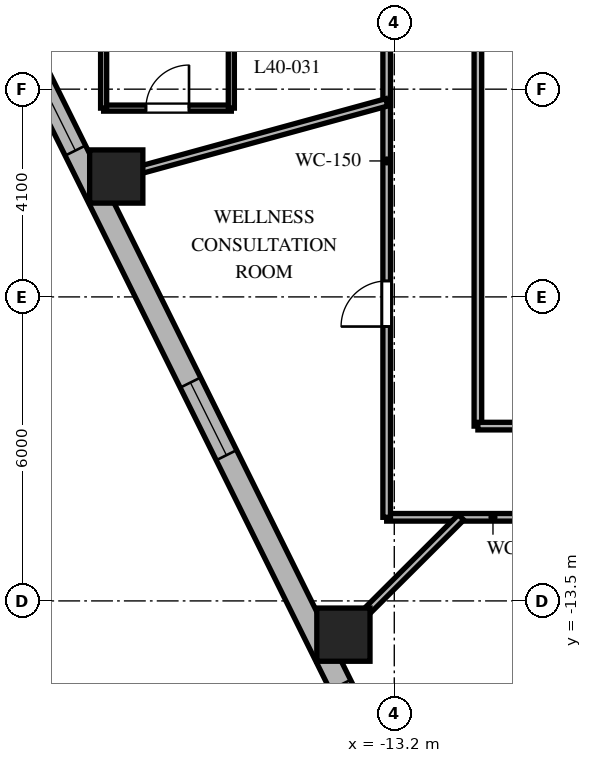
"""IFC4 building model, lengths in metres.
Left out: names, types, materials, properties, quantities, classifications, styles, units other than length and angle.
Written with IfcOpenShell. Run it as: python <this file> out.ifc"""

import sys

from ifc_helpers import new_model, si_unit, direction, frame, frame_2d, origin, origin_2d, place, context, subcontext, project, spatial, rectangle, extrude, element, fill, save


model = new_model("IFC4")
c1 = context("Model", 3, precision=1e-05, world=origin(), true_north=direction((0.0, 1.0)))
c2 = subcontext(c1, "Body", "Model", "MODEL_VIEW")
j1 = project(units=[si_unit("LENGTHUNIT", "METRE"), si_unit("PLANEANGLEUNIT", "RADIAN")], contexts=[c1])
p1 = place(None, origin())
s1 = spatial("IfcSite", under=j1, at=p1, CompositionType="ELEMENT")
p2 = place(p1, origin())
s2 = spatial("IfcBuilding", under=s1, at=p2, CompositionType="ELEMENT")
p3 = place(p2, frame((0.0, 0.0, 162.8)))
s3 = spatial("IfcBuildingStorey", under=s2, at=p3, CompositionType="ELEMENT", Elevation=162.8)
for number, where, z_axis, x_axis in (
    (1, (-18.687, -5.124, 0.0), (0.0, 0.0, 1.0), (1.0, 0.0, 0.0)),
    (2, (-14.204, -14.166, 0.0), (0.0, 0.0, 1.0), (1.0, 0.0, 0.0)),
):
    element("IfcColumn", number, at=place(p3, frame(where, z_axis=z_axis, x_axis=x_axis)), inside=s3, PredefinedType="COLUMN", context=c2, shape_type="SweptSolid", body=[
        extrude(rectangle(XDim=1.05, YDim=1.05, at=origin_2d()), origin(), (0.0, 0.0, 1.0), 3.7),
    ])
p4 = place(p3, frame((-20.618, -2.344, 0.0), z_axis=(0.0, 0.0, 1.0), x_axis=(0.444243691097, -0.895905990002, 0.0)))
e3 = element("IfcWall", 3, at=p4, inside=s3, PredefinedType="SOLIDWALL", context=c2, shape_type="SweptSolid", body=[
    extrude(rectangle(XDim=16.784, YDim=0.45, at=frame_2d((8.392, 0.0))), origin(), (0.0, 0.0, 1.0), 3.4),
])
p5 = place(p4, frame((0.931, 0.0, 0.8)))
e4 = element("IfcOpeningElement", 4, at=p5, cuts=e3, PredefinedType="OPENING", context=c2, shape_type="SweptSolid", body=[
    extrude(rectangle(XDim=1.6, YDim=1.75, at=frame_2d((0.8, 0.875))), frame((0.0, 0.235, 0.0), z_axis=(0.0, -1.0, 0.0), x_axis=(1.0, 0.0, 0.0)), (0.0, 0.0, 1.0), 0.47),
])
p6 = place(p4, frame((7.642, 0.0, 0.8)))
e5 = element("IfcOpeningElement", 5, at=p6, cuts=e3, PredefinedType="OPENING", context=c2, shape_type="SweptSolid", body=[
    extrude(rectangle(XDim=1.6, YDim=1.75, at=frame_2d((0.8, 0.875))), frame((0.0, 0.235, 0.0), z_axis=(0.0, -1.0, 0.0), x_axis=(1.0, 0.0, 0.0)), (0.0, 0.0, 1.0), 0.47),
])
p7 = place(p4, frame((14.303, 0.0, 0.8)))
e6 = element("IfcOpeningElement", 6, at=p7, cuts=e3, PredefinedType="OPENING", context=c2, shape_type="SweptSolid", body=[
    extrude(rectangle(XDim=1.6, YDim=1.75, at=frame_2d((0.8, 0.875))), frame((0.0, 0.235, 0.0), z_axis=(0.0, -1.0, 0.0), x_axis=(1.0, 0.0, 0.0)), (0.0, 0.0, 1.0), 0.47),
])
p8 = place(p3, frame((13.35, -11.85, 0.0), z_axis=(0.0, 0.0, 1.0), x_axis=(-1.0, 0.0, 0.0)))
e7 = element("IfcWall", 7, at=p8, inside=s3, PredefinedType="PARTITIONING", context=c2, shape_type="SweptSolid", body=[
    extrude(rectangle(XDim=26.7, YDim=0.15, at=frame_2d((13.35, 0.0))), origin(), (0.0, 0.0, 1.0), 2.84),
])
p9 = place(p8, frame((20.682, 0.0, 0.0)))
e8 = element("IfcOpeningElement", 8, at=p9, cuts=e7, PredefinedType="OPENING", context=c2, shape_type="SweptSolid", body=[
    extrude(rectangle(XDim=0.95, YDim=2.03, at=frame_2d((0.475, 1.015))), frame((0.0, 0.085, 0.0), z_axis=(0.0, -1.0, 0.0), x_axis=(1.0, 0.0, 0.0)), (0.0, 0.0, 1.0), 0.17),
])
p10 = place(p8, frame((14.708, 0.0, 0.0)))
e9 = element("IfcOpeningElement", 9, at=p10, cuts=e7, PredefinedType="OPENING", context=c2, shape_type="SweptSolid", body=[
    extrude(rectangle(XDim=0.95, YDim=2.03, at=frame_2d((0.475, 1.015))), frame((0.0, 0.085, 0.0), z_axis=(0.0, -1.0, 0.0), x_axis=(1.0, 0.0, 0.0)), (0.0, 0.0, 1.0), 0.17),
])
p11 = place(p8, frame((10.553, 0.0, 0.0)))
e10 = element("IfcOpeningElement", 10, at=p11, cuts=e7, PredefinedType="OPENING", context=c2, shape_type="SweptSolid", body=[
    extrude(rectangle(XDim=0.95, YDim=2.03, at=frame_2d((0.475, 1.015))), frame((0.0, 0.085, 0.0), z_axis=(0.0, -1.0, 0.0), x_axis=(1.0, 0.0, 0.0)), (0.0, 0.0, 1.0), 0.17),
])
p12 = place(p8, frame((6.353, 0.0, 0.0)))
e11 = element("IfcOpeningElement", 11, at=p12, cuts=e7, PredefinedType="OPENING", context=c2, shape_type="SweptSolid", body=[
    extrude(rectangle(XDim=0.9, YDim=2.03, at=frame_2d((0.45, 1.015))), frame((0.0, 0.085, 0.0), z_axis=(0.0, -1.0, 0.0), x_axis=(1.0, 0.0, 0.0)), (0.0, 0.0, 1.0), 0.17),
])
p13 = place(p8, frame((2.15, 0.0, 0.0)))
e12 = element("IfcOpeningElement", 12, at=p13, cuts=e7, PredefinedType="OPENING", context=c2, shape_type="SweptSolid", body=[
    extrude(rectangle(XDim=0.9, YDim=2.03, at=frame_2d((0.45, 1.015))), frame((0.0, 0.085, 0.0), z_axis=(0.0, -1.0, 0.0), x_axis=(1.0, 0.0, 0.0)), (0.0, 0.0, 1.0), 0.17),
])
p14 = place(p3, frame((-13.35, -11.85, 0.0), z_axis=(0.0, 0.0, 1.0), x_axis=(0.0, 1.0, 0.0)))
e13 = element("IfcWall", 13, at=p14, inside=s3, PredefinedType="PARTITIONING", context=c2, shape_type="SweptSolid", body=[
    extrude(rectangle(XDim=23.7, YDim=0.15, at=frame_2d((11.85, 0.0))), origin(), (0.0, 0.0, 1.0), 2.84),
])
p15 = place(p14, frame((20.136, 0.0, 0.0)))
e14 = element("IfcOpeningElement", 14, at=p15, cuts=e13, PredefinedType="OPENING", context=c2, shape_type="SweptSolid", body=[
    extrude(rectangle(XDim=0.9, YDim=2.03, at=frame_2d((0.45, 1.015))), frame((0.0, 0.085, 0.0), z_axis=(0.0, -1.0, 0.0), x_axis=(1.0, 0.0, 0.0)), (0.0, 0.0, 1.0), 0.17),
])
p16 = place(p14, frame((15.551, 0.0, 0.0)))
e15 = element("IfcOpeningElement", 15, at=p16, cuts=e13, PredefinedType="OPENING", context=c2, shape_type="SweptSolid", body=[
    extrude(rectangle(XDim=0.9, YDim=2.03, at=frame_2d((0.45, 1.015))), frame((0.0, 0.085, 0.0), z_axis=(0.0, -1.0, 0.0), x_axis=(1.0, 0.0, 0.0)), (0.0, 0.0, 1.0), 0.17),
])
p17 = place(p14, frame((12.494, 0.0, 0.0)))
e16 = element("IfcOpeningElement", 16, at=p17, cuts=e13, PredefinedType="OPENING", context=c2, shape_type="SweptSolid", body=[
    extrude(rectangle(XDim=0.9, YDim=2.03, at=frame_2d((0.45, 1.015))), frame((0.0, 0.085, 0.0), z_axis=(0.0, -1.0, 0.0), x_axis=(1.0, 0.0, 0.0)), (0.0, 0.0, 1.0), 0.17),
])
p18 = place(p14, frame((9.424, 0.0, 0.0)))
e17 = element("IfcOpeningElement", 17, at=p18, cuts=e13, PredefinedType="OPENING", context=c2, shape_type="SweptSolid", body=[
    extrude(rectangle(XDim=0.95, YDim=2.03, at=frame_2d((0.475, 1.015))), frame((0.0, 0.085, 0.0), z_axis=(0.0, -1.0, 0.0), x_axis=(1.0, 0.0, 0.0)), (0.0, 0.0, 1.0), 0.17),
])
p19 = place(p14, frame((3.765, 0.0, 0.0)))
e18 = element("IfcOpeningElement", 18, at=p19, cuts=e13, PredefinedType="OPENING", context=c2, shape_type="SweptSolid", body=[
    extrude(rectangle(XDim=0.9, YDim=2.03, at=frame_2d((0.45, 1.015))), frame((0.0, 0.085, 0.0), z_axis=(0.0, -1.0, 0.0), x_axis=(1.0, 0.0, 0.0)), (0.0, 0.0, 1.0), 0.17),
])
p20 = place(p3, frame((-11.55, 2.7, 0.0), z_axis=(0.0, 0.0, 1.0), x_axis=(0.0, -1.0, 0.0)))
e19 = element("IfcWall", 19, at=p20, inside=s3, PredefinedType="PARTITIONING", context=c2, shape_type="SweptSolid", body=[
    extrude(rectangle(XDim=12.75, YDim=0.15, at=frame_2d((6.375, 0.0))), origin(), (0.0, 0.0, 1.0), 2.84),
])
p21 = place(p3, frame((-11.55, -10.05, 0.0), z_axis=(0.0, 0.0, 1.0), x_axis=(1.0, 0.0, 0.0)))
e20 = element("IfcWall", 20, at=p21, inside=s3, PredefinedType="PARTITIONING", context=c2, shape_type="SweptSolid", body=[
    extrude(rectangle(XDim=11.55, YDim=0.15, at=frame_2d((5.775, 0.0))), origin(), (0.0, 0.0, 1.0), 2.84),
])
p22 = place(p3, frame((-13.35, -3.661, 0.0), z_axis=(0.0, 0.0, 1.0), x_axis=(-0.964397145454, -0.264458211898, 0.0)))
e21 = element("IfcWall", 21, at=p22, inside=s3, PredefinedType="PARTITIONING", context=c2, shape_type="SweptSolid", body=[
    extrude(rectangle(XDim=6.039, YDim=0.15, at=frame_2d((3.019, 0.0))), origin(), (0.0, 0.0, 1.0), 2.64),
])
p23 = place(p3, frame((-11.882, -11.85, 0.0), z_axis=(0.0, 0.0, 1.0), x_axis=(-0.708037373639, -0.706174962407, 0.0)))
e22 = element("IfcWall", 22, at=p23, inside=s3, PredefinedType="PARTITIONING", context=c2, shape_type="SweptSolid", body=[
    extrude(rectangle(XDim=3.802, YDim=0.15, at=frame_2d((1.901, 0.0))), origin(), (0.0, 0.0, 1.0), 2.64),
])
p24 = place(p3, frame((-18.936, -3.774, 0.0), z_axis=(0.0, 0.0, 1.0), x_axis=(1.0, 0.0, 0.0)))
e23 = element("IfcWall", 23, at=p24, inside=s3, PredefinedType="PARTITIONING", context=c2, shape_type="SweptSolid", body=[
    extrude(rectangle(XDim=2.52, YDim=0.12, at=frame_2d((1.26, 0.0))), origin(), (0.0, 0.0, 1.0), 2.64),
])
p25 = place(p24, frame((0.835, 0.0, 0.0)))
e24 = element("IfcOpeningElement", 24, at=p25, cuts=e23, PredefinedType="OPENING", context=c2, shape_type="SweptSolid", body=[
    extrude(rectangle(XDim=0.85, YDim=2.03, at=frame_2d((0.425, 1.015))), frame((0.0, 0.07, 0.0), z_axis=(0.0, -1.0, 0.0), x_axis=(1.0, 0.0, 0.0)), (0.0, 0.0, 1.0), 0.14),
])
p26 = place(p3, frame((-16.416, -3.774, 0.0), z_axis=(0.0, 0.0, 1.0), x_axis=(0.0, 1.0, 0.0)))
e25 = element("IfcWall", 25, at=p26, inside=s3, PredefinedType="PARTITIONING", context=c2, shape_type="SweptSolid", body=[
    extrude(rectangle(XDim=2.68, YDim=0.12, at=frame_2d((1.34, 0.0))), origin(), (0.0, 0.0, 1.0), 3.4),
])
p27 = place(p3, frame((-18.936, -1.094, 0.0), z_axis=(0.0, 0.0, 1.0), x_axis=(0.0, -1.0, 0.0)))
e26 = element("IfcWall", 26, at=p27, inside=s3, PredefinedType="PARTITIONING", context=c2, shape_type="SweptSolid", body=[
    extrude(rectangle(XDim=2.68, YDim=0.12, at=frame_2d((1.34, 0.0))), origin(), (0.0, 0.0, 1.0), 2.64),
])
p28 = place(p5, origin())
e27 = element("IfcWindow", 27, at=p28, inside=s3, PartitioningType="SINGLE_PANEL", PredefinedType="WINDOW", context=c2, shape_type="SweptSolid", body=[
    extrude(rectangle(XDim=1.6, YDim=1.75, at=frame_2d((0.8, 0.875))), frame((0.0, 0.03, 0.0), z_axis=(0.0, -1.0, 0.0), x_axis=(1.0, 0.0, 0.0)), (0.0, 0.0, 1.0), 0.06),
])
fill(e4, e27)
p29 = place(p6, origin())
e28 = element("IfcWindow", 28, at=p29, inside=s3, PartitioningType="SINGLE_PANEL", PredefinedType="WINDOW", context=c2, shape_type="SweptSolid", body=[
    extrude(rectangle(XDim=1.6, YDim=1.75, at=frame_2d((0.8, 0.875))), frame((0.0, 0.03, 0.0), z_axis=(0.0, -1.0, 0.0), x_axis=(1.0, 0.0, 0.0)), (0.0, 0.0, 1.0), 0.06),
])
fill(e5, e28)
p30 = place(p25, origin())
e29 = element("IfcDoor", 29, at=p30, inside=s3, OperationType="SINGLE_SWING_RIGHT", PredefinedType="DOOR", context=c2, shape_type="SweptSolid", body=[
    extrude(rectangle(XDim=0.85, YDim=2.03, at=frame_2d((0.425, 1.015))), frame((0.0, 0.025, 0.0), z_axis=(0.0, -1.0, 0.0), x_axis=(1.0, 0.0, 0.0)), (0.0, 0.0, 1.0), 0.05),
])
fill(e24, e29)
p31 = place(p19, origin())
e30 = element("IfcDoor", 30, at=p31, inside=s3, OperationType="SINGLE_SWING_LEFT", PredefinedType="DOOR", context=c2, shape_type="SweptSolid", body=[
    extrude(rectangle(XDim=0.9, YDim=2.03, at=frame_2d((0.45, 1.015))), frame((0.0, 0.025, 0.0), z_axis=(0.0, -1.0, 0.0), x_axis=(1.0, 0.0, 0.0)), (0.0, 0.0, 1.0), 0.05),
])
fill(e18, e30)
save(model, sys.argv[1])
